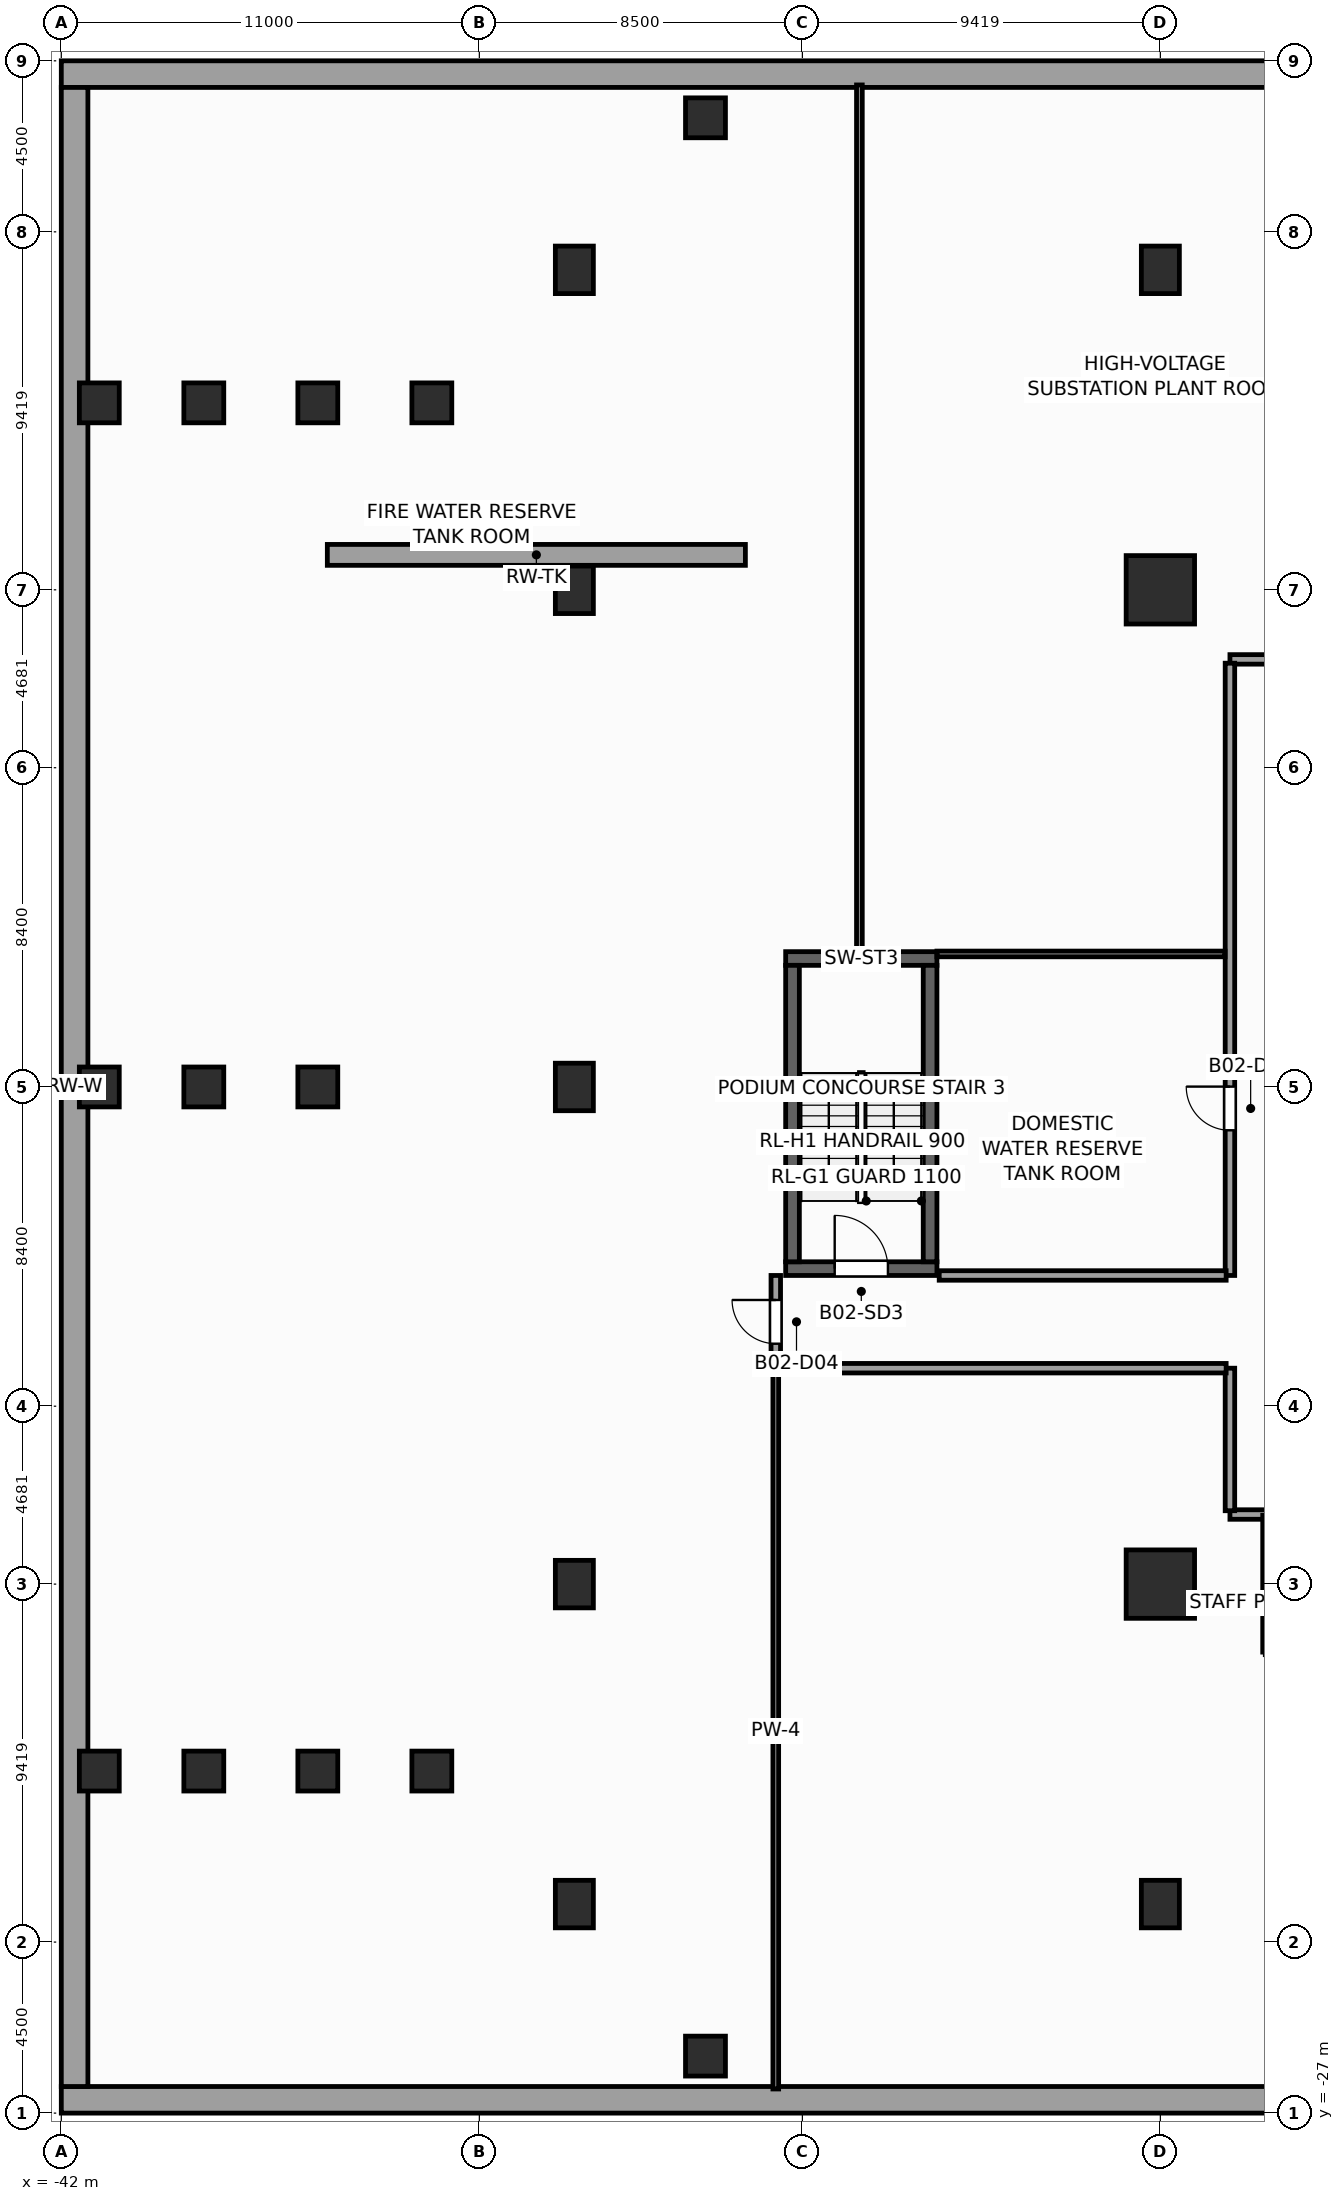
"""IFC4 building model, lengths in metres.
Left out: names, types, materials, properties, quantities, classifications, styles, units other than length and angle.
Written with IfcOpenShell. Run it as: python <this file> out.ifc"""

import sys

from ifc_helpers import new_model, si_unit, direction, frame, frame_2d, origin, origin_2d, place, context, subcontext, project, spatial, rectangle, extrude, source, transform, mapped, element, fill, save


model = new_model("IFC4")
c1 = context("Model", 3, precision=1e-05, world=origin(), true_north=direction((0.0, 1.0)))
c2 = subcontext(c1, "Body", "Model", "MODEL_VIEW")
j1 = project(units=[si_unit("LENGTHUNIT", "METRE"), si_unit("PLANEANGLEUNIT", "RADIAN")], contexts=[c1])
p1 = place(None, origin())
s1 = spatial("IfcSite", under=j1, at=p1, CompositionType="ELEMENT")
p2 = place(p1, origin())
s2 = spatial("IfcBuilding", under=s1, at=p2, CompositionType="ELEMENT")
p3 = place(p2, frame((0.0, 0.0, -9.0)))
s3 = spatial("IfcBuildingStorey", under=s2, at=p3, CompositionType="ELEMENT", Elevation=-9.0)
p4 = place(p3, frame((-22.94, -4.78, 0.0), z_axis=(0.0, 0.0, 1.0), x_axis=(1.0, 0.0, 0.0)))
e1 = element("IfcWall", 1, at=p4, inside=s3, PredefinedType="SHEAR", context=c2, shape_type="SweptSolid", body=[
    extrude(rectangle(XDim=3.98, YDim=0.36, at=frame_2d((1.99, 0.0))), origin(), (0.0, 0.0, 1.0), 4.5),
])
p5 = place(p4, frame((1.29, 0.0, 0.0)))
e2 = element("IfcOpeningElement", 2, at=p5, cuts=e1, PredefinedType="OPENING", context=c2, shape_type="SweptSolid", body=[
    extrude(rectangle(XDim=1.4, YDim=2.2, at=frame_2d((0.7, 1.1))), frame((0.0, 0.19, 0.0), z_axis=(0.0, -1.0, 0.0), x_axis=(1.0, 0.0, 0.0)), (0.0, 0.0, 1.0), 0.38),
])
p6 = place(p3, frame((-22.94, 3.38, 0.0), z_axis=(0.0, 0.0, 1.0), x_axis=(1.0, 0.0, 0.0)))
e3 = element("IfcWall", 3, at=p6, inside=s3, PredefinedType="SHEAR", context=c2, shape_type="SweptSolid", body=[
    extrude(rectangle(XDim=3.98, YDim=0.36, at=frame_2d((1.99, 0.0))), origin(), (0.0, 0.0, 1.0), 4.5),
])
for number, where, z_axis, x_axis in (
    (4, (-22.76, -4.6, 0.0), (0.0, 0.0, 1.0), (0.0, 1.0, 0.0)),
    (5, (-19.14, -4.6, 0.0), (0.0, 0.0, 1.0), (0.0, 1.0, 0.0)),
):
    element("IfcWall", number, at=place(p3, frame(where, z_axis=z_axis, x_axis=x_axis)), inside=s3, PredefinedType="SHEAR", context=c2, shape_type="SweptSolid", body=[
        extrude(rectangle(XDim=7.8, YDim=0.36, at=frame_2d((3.9, 0.0))), origin(), (0.0, 0.0, 1.0), 4.5),
    ])
for number, where, z_axis, x_axis in (
    (6, (-42.0, -26.65, 0.0), (0.0, 0.0, 1.0), (1.0, 0.0, 0.0)),
    (7, (-42.0, 26.65, 0.0), (0.0, 0.0, 1.0), (1.0, 0.0, 0.0)),
):
    element("IfcWall", number, at=place(p3, frame(where, z_axis=z_axis, x_axis=x_axis)), inside=s3, PredefinedType="USERDEFINED", context=c2, shape_type="SweptSolid", body=[
        extrude(rectangle(XDim=84.0, YDim=0.7, at=frame_2d((42.0, 0.0))), origin(), (0.0, 0.0, 1.0), 4.5),
    ])
p7 = place(p3, frame((-41.65, -26.3, 0.0), z_axis=(0.0, 0.0, 1.0), x_axis=(0.0, 1.0, 0.0)))
e8 = element("IfcWall", 8, at=p7, inside=s3, PredefinedType="USERDEFINED", context=c2, shape_type="SweptSolid", body=[
    extrude(rectangle(XDim=52.6, YDim=0.7, at=frame_2d((26.3, 0.0))), origin(), (0.0, 0.0, 1.0), 4.5),
])
p8 = place(p3, frame((-35.0, 14.0, 0.0), z_axis=(0.0, 0.0, 1.0), x_axis=(1.0, 0.0, 0.0)))
e9 = element("IfcWall", 9, at=p8, inside=s3, PredefinedType="USERDEFINED", context=c2, shape_type="SweptSolid", body=[
    extrude(rectangle(XDim=11.0, YDim=0.55, at=frame_2d((5.5, 0.0))), origin(), (0.0, 0.0, 1.0), 4.5),
])
m1 = source(origin(), c2, "Body", "SweptSolid", [
    extrude(rectangle(XDim=1.8, YDim=1.8, at=origin_2d()), origin(), (0.0, 0.0, 1.0), 4.5),
])
for number, where, z_axis, x_axis in (
    (10, (-13.081, -13.081, 0.0), (0.0, 0.0, 1.0), (1.0, 0.0, 0.0)),
    (11, (-13.081, 13.081, 0.0), (0.0, 0.0, 1.0), (1.0, 0.0, 0.0)),
):
    element("IfcColumn", number, at=place(p3, frame(where, z_axis=z_axis, x_axis=x_axis)), inside=s3, PredefinedType="COLUMN", context=c2, shape_type="MappedRepresentation", body=[
        mapped(m1, transform((0.0, 0.0, 0.0), scale=1.0)),
    ])
m2 = source(origin(), c2, "Body", "SweptSolid", [
    extrude(rectangle(XDim=1.0, YDim=1.25, at=origin_2d()), origin(), (0.0, 0.0, 1.0), 4.5),
])
for number, where, z_axis, x_axis in (
    (12, (-28.5, -21.5, 0.0), (0.0, 0.0, 1.0), (1.0, 0.0, 0.0)),
    (13, (-13.081, -21.5, 0.0), (0.0, 0.0, 1.0), (1.0, 0.0, 0.0)),
    (14, (-28.5, 21.5, 0.0), (0.0, 0.0, 1.0), (1.0, 0.0, 0.0)),
    (15, (-13.081, 21.5, 0.0), (0.0, 0.0, 1.0), (1.0, 0.0, 0.0)),
    (16, (-28.5, -13.081, 0.0), (0.0, 0.0, 1.0), (1.0, 0.0, 0.0)),
    (17, (-28.5, 0.0, 0.0), (0.0, 0.0, 1.0), (1.0, 0.0, 0.0)),
    (18, (-28.5, 13.081, 0.0), (0.0, 0.0, 1.0), (1.0, 0.0, 0.0)),
):
    element("IfcColumn", number, at=place(p3, frame(where, z_axis=z_axis, x_axis=x_axis)), inside=s3, PredefinedType="COLUMN", context=c2, shape_type="MappedRepresentation", body=[
        mapped(m2, transform((0.0, 0.0, 0.0), scale=1.0)),
    ])
m3 = source(origin(), c2, "Body", "SweptSolid", [
    extrude(rectangle(XDim=1.05, YDim=1.05, at=origin_2d()), origin(), (0.0, 0.0, 1.0), 4.5),
])
for number, where, z_axis, x_axis in (
    (19, (-25.05, -25.5, 0.0), (0.0, 0.0, 1.0), (1.0, 0.0, 0.0)),
    (20, (-25.05, 25.5, 0.0), (0.0, 0.0, 1.0), (1.0, 0.0, 0.0)),
    (21, (-32.25, -18.0, 0.0), (0.0, 0.0, 1.0), (1.0, 0.0, 0.0)),
    (22, (-32.25, 18.0, 0.0), (0.0, 0.0, 1.0), (1.0, 0.0, 0.0)),
    (23, (-35.25, -18.0, 0.0), (0.0, 0.0, 1.0), (1.0, 0.0, 0.0)),
    (24, (-35.25, 0.0, 0.0), (0.0, 0.0, 1.0), (1.0, 0.0, 0.0)),
    (25, (-35.25, 18.0, 0.0), (0.0, 0.0, 1.0), (1.0, 0.0, 0.0)),
    (26, (-38.25, -18.0, 0.0), (0.0, 0.0, 1.0), (1.0, 0.0, 0.0)),
    (27, (-38.25, 0.0, 0.0), (0.0, 0.0, 1.0), (1.0, 0.0, 0.0)),
    (28, (-38.25, 18.0, 0.0), (0.0, 0.0, 1.0), (1.0, 0.0, 0.0)),
    (29, (-41.0, -18.0, 0.0), (0.0, 0.0, 1.0), (1.0, 0.0, 0.0)),
    (30, (-41.0, 0.0, 0.0), (0.0, 0.0, 1.0), (1.0, 0.0, 0.0)),
    (31, (-41.0, 18.0, 0.0), (0.0, 0.0, 1.0), (1.0, 0.0, 0.0)),
):
    element("IfcColumn", number, at=place(p3, frame(where, z_axis=z_axis, x_axis=x_axis)), inside=s3, PredefinedType="COLUMN", context=c2, shape_type="MappedRepresentation", body=[
        mapped(m3, transform((0.0, 0.0, 0.0), scale=1.0)),
    ])
p9 = place(p3, frame((-11.25, -11.25, 0.0), z_axis=(0.0, 0.0, 1.0), x_axis=(1.0, 0.0, 0.0)))
e32 = element("IfcWall", 32, at=p9, inside=s3, PredefinedType="PARTITIONING", context=c2, shape_type="SweptSolid", body=[
    extrude(rectangle(XDim=22.5, YDim=0.25, at=frame_2d((11.25, 0.0))), origin(), (0.0, 0.0, 1.0), 4.18),
])
p10 = place(p9, frame((1.755, 0.0, 0.0)))
e33 = element("IfcOpeningElement", 33, at=p10, cuts=e32, PredefinedType="OPENING", context=c2, shape_type="SweptSolid", body=[
    extrude(rectangle(XDim=0.95, YDim=2.1, at=frame_2d((0.475, 1.05))), frame((0.0, 0.135, 0.0), z_axis=(0.0, -1.0, 0.0), x_axis=(1.0, 0.0, 0.0)), (0.0, 0.0, 1.0), 0.27),
])
p11 = place(p9, frame((12.27, 0.0, 0.0)))
e34 = element("IfcOpeningElement", 34, at=p11, cuts=e32, PredefinedType="OPENING", context=c2, shape_type="SweptSolid", body=[
    extrude(rectangle(XDim=1.15, YDim=2.25, at=frame_2d((0.575, 1.125))), frame((0.0, 0.135, 0.0), z_axis=(0.0, -1.0, 0.0), x_axis=(1.0, 0.0, 0.0)), (0.0, 0.0, 1.0), 0.27),
])
p12 = place(p3, frame((-11.25, 11.25, 0.0), z_axis=(0.0, 0.0, 1.0), x_axis=(1.0, 0.0, 0.0)))
e35 = element("IfcWall", 35, at=p12, inside=s3, PredefinedType="PARTITIONING", context=c2, shape_type="SweptSolid", body=[
    extrude(rectangle(XDim=22.5, YDim=0.25, at=frame_2d((11.25, 0.0))), origin(), (0.0, 0.0, 1.0), 4.18),
])
p13 = place(p12, frame((10.675, 0.0, 0.0)))
e36 = element("IfcOpeningElement", 36, at=p13, cuts=e35, PredefinedType="OPENING", context=c2, shape_type="SweptSolid", body=[
    extrude(rectangle(XDim=1.15, YDim=2.25, at=frame_2d((0.575, 1.125))), frame((0.0, 0.135, 0.0), z_axis=(0.0, -1.0, 0.0), x_axis=(1.0, 0.0, 0.0)), (0.0, 0.0, 1.0), 0.27),
])
p14 = place(p3, frame((-11.25, -11.15, 0.0), z_axis=(0.0, 0.0, 1.0), x_axis=(0.0, 1.0, 0.0)))
e37 = element("IfcWall", 37, at=p14, inside=s3, PredefinedType="PARTITIONING", context=c2, shape_type="SweptSolid", body=[
    extrude(rectangle(XDim=3.75, YDim=0.25, at=frame_2d((1.875, 0.0))), origin(), (0.0, 0.0, 1.0), 4.18),
])
p15 = place(p3, frame((-11.25, -4.96, 0.0), z_axis=(0.0, 0.0, 1.0), x_axis=(0.0, 1.0, 0.0)))
e38 = element("IfcWall", 38, at=p15, inside=s3, PredefinedType="PARTITIONING", context=c2, shape_type="SweptSolid", body=[
    extrude(rectangle(XDim=16.11, YDim=0.25, at=frame_2d((8.055, 0.0))), origin(), (0.0, 0.0, 1.0), 4.18),
])
p16 = place(p15, frame((3.82, 0.0, 0.0)))
e39 = element("IfcOpeningElement", 39, at=p16, cuts=e38, PredefinedType="OPENING", context=c2, shape_type="SweptSolid", body=[
    extrude(rectangle(XDim=1.15, YDim=2.25, at=frame_2d((0.575, 1.125))), frame((0.0, 0.135, 0.0), z_axis=(0.0, -1.0, 0.0), x_axis=(1.0, 0.0, 0.0)), (0.0, 0.0, 1.0), 0.27),
])
p17 = place(p3, frame((-23.2, -7.4, 0.0), z_axis=(0.0, 0.0, 1.0), x_axis=(1.0, 0.0, 0.0)))
e40 = element("IfcWall", 40, at=p17, inside=s3, PredefinedType="PARTITIONING", context=c2, shape_type="SweptSolid", body=[
    extrude(rectangle(XDim=11.85, YDim=0.25, at=frame_2d((5.925, 0.0))), origin(), (0.0, 0.0, 1.0), 4.18),
])
p18 = place(p3, frame((-18.9, -4.96, 0.0), z_axis=(0.0, 0.0, 1.0), x_axis=(1.0, 0.0, 0.0)))
e41 = element("IfcWall", 41, at=p18, inside=s3, PredefinedType="PARTITIONING", context=c2, shape_type="SweptSolid", body=[
    extrude(rectangle(XDim=7.55, YDim=0.25, at=frame_2d((3.775, 0.0))), origin(), (0.0, 0.0, 1.0), 4.18),
])
p19 = place(p3, frame((-23.2, -7.4, 0.0), z_axis=(0.0, 0.0, 1.0), x_axis=(0.0, 1.0, 0.0)))
e42 = element("IfcWall", 42, at=p19, inside=s3, PredefinedType="PARTITIONING", context=c2, shape_type="SweptSolid", body=[
    extrude(rectangle(XDim=2.44, YDim=0.25, at=frame_2d((1.22, 0.0))), origin(), (0.0, 0.0, 1.0), 4.18),
])
p20 = place(p19, frame((0.645, 0.0, 0.0)))
e43 = element("IfcOpeningElement", 43, at=p20, cuts=e42, PredefinedType="OPENING", context=c2, shape_type="SweptSolid", body=[
    extrude(rectangle(XDim=1.15, YDim=2.25, at=frame_2d((0.575, 1.125))), frame((0.0, 0.135, 0.0), z_axis=(0.0, -1.0, 0.0), x_axis=(1.0, 0.0, 0.0)), (0.0, 0.0, 1.0), 0.27),
])
p21 = place(p3, frame((-23.2, -26.365, 0.0), z_axis=(0.0, 0.0, 1.0), x_axis=(0.0, 1.0, 0.0)))
e44 = element("IfcWall", 44, at=p21, inside=s3, PredefinedType="PARTITIONING", context=c2, shape_type="SweptSolid", body=[
    extrude(rectangle(XDim=18.835, YDim=0.15, at=frame_2d((9.417, 0.0))), origin(), (0.0, 0.0, 1.0), 4.18),
])
p22 = place(p3, frame((-21.0, 3.56, 0.0), z_axis=(0.0, 0.0, 1.0), x_axis=(0.0, 1.0, 0.0)))
e45 = element("IfcWall", 45, at=p22, inside=s3, PredefinedType="PARTITIONING", context=c2, shape_type="SweptSolid", body=[
    extrude(rectangle(XDim=22.805, YDim=0.15, at=frame_2d((11.402, 0.0))), origin(), (0.0, 0.0, 1.0), 4.18),
])
p23 = place(p3, frame((-18.96, 3.5, 0.0), z_axis=(0.0, 0.0, 1.0), x_axis=(1.0, 0.0, 0.0)))
e46 = element("IfcWall", 46, at=p23, inside=s3, PredefinedType="PARTITIONING", context=c2, shape_type="SweptSolid", body=[
    extrude(rectangle(XDim=7.58, YDim=0.15, at=frame_2d((3.79, 0.0))), origin(), (0.0, 0.0, 1.0), 4.18),
])
p24 = place(p3, frame((-10.32, -14.87, 0.0), z_axis=(0.0, 0.0, 1.0), x_axis=(0.0, 1.0, 0.0)))
e47 = element("IfcWall", 47, at=p24, inside=s3, PredefinedType="PARTITIONING", context=c2, shape_type="SweptSolid", body=[
    extrude(rectangle(XDim=3.6, YDim=0.135, at=frame_2d((1.8, 0.0))), origin(), (0.0, 0.0, 1.0), 4.18),
])
m4 = source(origin(), c2, "Body", "SweptSolid", [
    extrude(rectangle(XDim=1.4, YDim=2.2, at=frame_2d((0.7, 1.1))), frame((0.0, 0.025, 0.0), z_axis=(0.0, -1.0, 0.0), x_axis=(1.0, 0.0, 0.0)), (0.0, 0.0, 1.0), 0.05),
])
p25 = place(p5, origin())
e48 = element("IfcDoor", 48, at=p25, inside=s3, OperationType="SINGLE_SWING_LEFT", PredefinedType="DOOR", context=c2, shape_type="MappedRepresentation", body=[
    mapped(m4, transform((0.0, 0.0, 0.0), scale=1.0)),
])
fill(e2, e48)
m5 = source(origin(), c2, "Body", "SweptSolid", [
    extrude(rectangle(XDim=1.15, YDim=2.25, at=frame_2d((0.575, 1.125))), frame((0.0, 0.025, 0.0), z_axis=(0.0, -1.0, 0.0), x_axis=(1.0, 0.0, 0.0)), (0.0, 0.0, 1.0), 0.05),
])
p26 = place(p20, origin())
e49 = element("IfcDoor", 49, at=p26, inside=s3, OperationType="SINGLE_SWING_RIGHT", PredefinedType="DOOR", context=c2, shape_type="MappedRepresentation", body=[
    mapped(m5, transform((0.0, 0.0, 0.0), scale=1.0)),
])
fill(e43, e49)
p27 = place(p16, origin())
e50 = element("IfcDoor", 50, at=p27, inside=s3, OperationType="SINGLE_SWING_RIGHT", PredefinedType="DOOR", context=c2, shape_type="MappedRepresentation", body=[
    mapped(m5, transform((0.0, 0.0, 0.0), scale=1.0)),
])
fill(e39, e50)
save(model, sys.argv[1])
